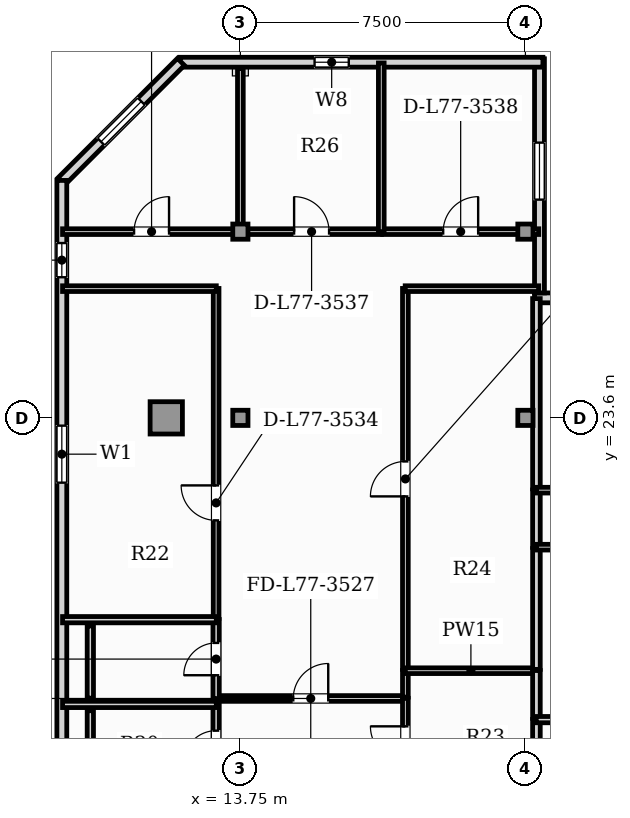
"""IFC4 building model, lengths in metres.
Left out: names, types, materials, properties, quantities, classifications, styles, units other than length and angle.
Written with IfcOpenShell. Run it as: python <this file> out.ifc"""

import sys

from ifc_helpers import new_model, si_unit, direction, frame, frame_2d, origin, origin_2d, place, context, subcontext, project, spatial, rectangle, hollow_rectangle, extrude, element, fill, save


model = new_model("IFC4")
c1 = context("Model", 3, precision=1e-05, world=origin(), true_north=direction((0.0, 1.0)))
c2 = subcontext(c1, "Body", "Model", "MODEL_VIEW")
j1 = project(units=[si_unit("LENGTHUNIT", "METRE"), si_unit("PLANEANGLEUNIT", "RADIAN")], contexts=[c1])
p1 = place(None, origin())
s1 = spatial("IfcSite", under=j1, at=p1, CompositionType="ELEMENT")
p2 = place(p1, origin())
s2 = spatial("IfcBuilding", under=s1, at=p2, CompositionType="ELEMENT")
p3 = place(p2, frame((0.0, 0.0, 313.05)))
s3 = spatial("IfcBuildingStorey", under=s2, at=p3, CompositionType="ELEMENT", Elevation=313.05)
p4 = place(p3, frame((11.8, 23.6, 0.0), z_axis=(0.0, 0.0, 1.0), x_axis=(1.0, 0.0, 0.0)))
e1 = element("IfcColumn", 1, at=p4, inside=s3, PredefinedType="USERDEFINED", context=c2, shape_type="SweptSolid", body=[
    extrude(hollow_rectangle(XDim=0.85, YDim=0.85, WallThickness=0.05, at=origin_2d()), origin(), (0.0, 0.0, 1.0), 3.85),
])
for number, where, z_axis, x_axis in (
    (2, (13.75, 23.6, 0.0), (0.0, 0.0, 1.0), (1.0, 0.0, 0.0)),
    (3, (21.25, 23.6, 0.0), (0.0, 0.0, 1.0), (1.0, 0.0, 0.0)),
    (4, (13.75, 28.5, 0.0), (0.0, 0.0, 1.0), (1.0, 0.0, 0.0)),
    (5, (21.25, 28.5, 0.0), (0.0, 0.0, 1.0), (1.0, 0.0, 0.0)),
):
    element("IfcColumn", number, at=place(p3, frame(where, z_axis=z_axis, x_axis=x_axis)), inside=s3, PredefinedType="COLUMN", context=c2, shape_type="SweptSolid", body=[
        extrude(hollow_rectangle(XDim=0.4, YDim=0.4, WallThickness=0.02, at=origin_2d()), origin(), (0.0, 0.0, 1.0), 3.85),
    ])
p5 = place(p3, frame((21.49, 26.758, 0.0), z_axis=(0.0, 0.0, 1.0), x_axis=(1.0, 0.0, 0.0)))
e6 = element("IfcWall", 6, at=p5, inside=s3, PredefinedType="SOLIDWALL", context=c2, shape_type="SweptSolid", body=[
    extrude(rectangle(XDim=1.76, YDim=0.26, at=frame_2d((0.88, 0.0))), origin(), (0.0, 0.0, 1.0), 3.65),
])
p6 = place(p3, frame((21.62, 26.887, 0.0), z_axis=(0.0, 0.0, 1.0), x_axis=(0.0, 1.0, 0.0)))
e7 = element("IfcWall", 7, at=p6, inside=s3, PredefinedType="SOLIDWALL", context=c2, shape_type="SweptSolid", body=[
    extrude(rectangle(XDim=6.16, YDim=0.26, at=frame_2d((3.08, 0.0))), origin(), (0.0, 0.0, 1.0), 3.65),
])
p7 = place(p6, frame((2.455, 0.0, 0.9)))
e8 = element("IfcOpeningElement", 8, at=p7, cuts=e7, PredefinedType="OPENING", context=c2, shape_type="SweptSolid", body=[
    extrude(rectangle(XDim=1.5, YDim=1.95, at=frame_2d((0.75, 0.975))), frame((0.0, 0.14, 0.0), z_axis=(0.0, -1.0, 0.0), x_axis=(1.0, 0.0, 0.0)), (0.0, 0.0, 1.0), 0.28),
])
p8 = place(p3, frame((21.71, 32.958, 0.0), z_axis=(0.0, 0.0, 1.0), x_axis=(-1.0, 0.0, 0.0)))
e9 = element("IfcWall", 9, at=p8, inside=s3, PredefinedType="SOLIDWALL", context=c2, shape_type="SweptSolid", body=[
    extrude(rectangle(XDim=9.548, YDim=0.26, at=frame_2d((4.774, 0.0))), origin(), (0.0, 0.0, 1.0), 3.65),
])
p9 = place(p8, frame((5.108, 0.0, 0.9)))
e10 = element("IfcOpeningElement", 10, at=p9, cuts=e9, PredefinedType="OPENING", context=c2, shape_type="SweptSolid", body=[
    extrude(rectangle(XDim=0.9, YDim=1.4, at=frame_2d((0.45, 0.7))), frame((0.0, 0.14, 0.0), z_axis=(0.0, -1.0, 0.0), x_axis=(1.0, 0.0, 0.0)), (0.0, 0.0, 1.0), 0.28),
])
p10 = place(p3, frame((12.186, 32.967, 0.0), z_axis=(0.0, 0.0, 1.0), x_axis=(-0.707134240044, -0.707079321262, 0.0)))
e11 = element("IfcWall", 11, at=p10, inside=s3, PredefinedType="SOLIDWALL", context=c2, shape_type="SweptSolid", body=[
    extrude(rectangle(XDim=4.446, YDim=0.26, at=frame_2d((2.223, 0.0))), origin(), (0.0, 0.0, 1.0), 3.65),
])
p11 = place(p10, frame((1.473, 0.0, 0.9)))
e12 = element("IfcOpeningElement", 12, at=p11, cuts=e11, PredefinedType="OPENING", context=c2, shape_type="SweptSolid", body=[
    extrude(rectangle(XDim=1.5, YDim=1.95, at=frame_2d((0.75, 0.975))), frame((0.0, 0.14, 0.0), z_axis=(0.0, -1.0, 0.0), x_axis=(1.0, 0.0, 0.0)), (0.0, 0.0, 1.0), 0.28),
])
p12 = place(p3, frame((9.052, 29.847, 0.0), z_axis=(0.0, 0.0, 1.0), x_axis=(0.0, -1.0, 0.0)))
e13 = element("IfcWall", 13, at=p12, inside=s3, PredefinedType="SOLIDWALL", context=c2, shape_type="SweptSolid", body=[
    extrude(rectangle(XDim=26.607, YDim=0.26, at=frame_2d((13.304, 0.0))), origin(), (0.0, 0.0, 1.0), 3.65),
])
p13 = place(p12, frame((20.707, 0.0, 0.85)))
e14 = element("IfcOpeningElement", 14, at=p13, cuts=e13, PredefinedType="OPENING", context=c2, shape_type="SweptSolid", body=[
    extrude(rectangle(XDim=2.1, YDim=2.05, at=frame_2d((1.05, 1.025))), frame((0.0, 0.14, 0.0), z_axis=(0.0, -1.0, 0.0), x_axis=(1.0, 0.0, 0.0)), (0.0, 0.0, 1.0), 0.28),
])
p14 = place(p12, frame((1.647, 0.0, 0.95)))
e15 = element("IfcOpeningElement", 15, at=p14, cuts=e13, PredefinedType="OPENING", context=c2, shape_type="SweptSolid", body=[
    extrude(rectangle(XDim=0.9, YDim=1.5, at=frame_2d((0.45, 0.75))), frame((0.0, 0.14, 0.0), z_axis=(0.0, -1.0, 0.0), x_axis=(1.0, 0.0, 0.0)), (0.0, 0.0, 1.0), 0.28),
])
p15 = place(p12, frame((6.453, 0.0, 0.9)))
e16 = element("IfcOpeningElement", 16, at=p15, cuts=e13, PredefinedType="OPENING", context=c2, shape_type="SweptSolid", body=[
    extrude(rectangle(XDim=1.5, YDim=1.95, at=frame_2d((0.75, 0.975))), frame((0.0, 0.14, 0.0), z_axis=(0.0, -1.0, 0.0), x_axis=(1.0, 0.0, 0.0)), (0.0, 0.0, 1.0), 0.28),
])
p16 = place(p3, frame((13.107, 16.217, 0.0), z_axis=(0.0, 0.0, 1.0), x_axis=(1.0, 0.0, 0.0)))
e17 = element("IfcWall", 17, at=p16, inside=s3, PredefinedType="PARTITIONING", context=c2, shape_type="SweptSolid", body=[
    extrude(rectangle(XDim=4.99, YDim=0.15, at=frame_2d((2.495, 0.0))), origin(), (0.0, 0.0, 1.0), 3.65),
])
p17 = place(p16, frame((2.035, 0.0, 0.0)))
e18 = element("IfcOpeningElement", 18, at=p17, cuts=e17, PredefinedType="OPENING", context=c2, shape_type="SweptSolid", body=[
    extrude(rectangle(XDim=0.92, YDim=2.1, at=frame_2d((0.46, 1.05))), frame((0.0, 0.085, 0.0), z_axis=(0.0, -1.0, 0.0), x_axis=(1.0, 0.0, 0.0)), (0.0, 0.0, 1.0), 0.17),
])
p18 = place(p3, frame((13.112, 13.825, 0.0), z_axis=(0.0, 0.0, 1.0), x_axis=(0.0, 1.0, 0.0)))
e19 = element("IfcWall", 19, at=p18, inside=s3, PredefinedType="PLUMBINGWALL", context=c2, shape_type="SweptSolid", body=[
    extrude(rectangle(XDim=2.24, YDim=0.165, at=frame_2d((1.12, 0.0))), origin(), (0.0, 0.0, 1.0), 3.65),
])
p19 = place(p18, frame((0.695, 0.0, 0.0)))
e20 = element("IfcOpeningElement", 20, at=p19, cuts=e19, PredefinedType="OPENING", context=c2, shape_type="SweptSolid", body=[
    extrude(rectangle(XDim=0.85, YDim=2.1, at=frame_2d((0.425, 1.05))), frame((0.0, 0.093, 0.0), z_axis=(0.0, -1.0, 0.0), x_axis=(1.0, 0.0, 0.0)), (0.0, 0.0, 1.0), 0.185),
])
p20 = place(p3, frame((18.092, 13.825, 0.0), z_axis=(0.0, 0.0, 1.0), x_axis=(0.0, 1.0, 0.0)))
e21 = element("IfcWall", 21, at=p20, inside=s3, PredefinedType="PARTITIONING", context=c2, shape_type="SweptSolid", body=[
    extrude(rectangle(XDim=2.397, YDim=0.15, at=frame_2d((1.198, 0.0))), origin(), (0.0, 0.0, 1.0), 3.65),
])
p21 = place(p20, frame((0.738, 0.0, 0.0)))
e22 = element("IfcOpeningElement", 22, at=p21, cuts=e21, PredefinedType="OPENING", context=c2, shape_type="SweptSolid", body=[
    extrude(rectangle(XDim=0.92, YDim=2.1, at=frame_2d((0.46, 1.05))), frame((0.0, 0.085, 0.0), z_axis=(0.0, -1.0, 0.0), x_axis=(1.0, 0.0, 0.0)), (0.0, 0.0, 1.0), 0.17),
])
p22 = place(p3, frame((13.112, 16.212, 0.0), z_axis=(0.0, 0.0, 1.0), x_axis=(0.0, 1.0, 0.0)))
e23 = element("IfcWall", 23, at=p22, inside=s3, PredefinedType="PLUMBINGWALL", context=c2, shape_type="SweptSolid", body=[
    extrude(rectangle(XDim=2.083, YDim=0.165, at=frame_2d((1.042, 0.0))), origin(), (0.0, 0.0, 1.0), 3.65),
])
p23 = place(p22, frame((0.616, 0.0, 0.0)))
e24 = element("IfcOpeningElement", 24, at=p23, cuts=e23, PredefinedType="OPENING", context=c2, shape_type="SweptSolid", body=[
    extrude(rectangle(XDim=0.85, YDim=2.1, at=frame_2d((0.425, 1.05))), frame((0.0, 0.093, 0.0), z_axis=(0.0, -1.0, 0.0), x_axis=(1.0, 0.0, 0.0)), (0.0, 0.0, 1.0), 0.185),
])
p24 = place(p3, frame((13.112, 18.325, 0.0), z_axis=(0.0, 0.0, 1.0), x_axis=(0.0, 1.0, 0.0)))
e25 = element("IfcWall", 25, at=p24, inside=s3, PredefinedType="PARTITIONING", context=c2, shape_type="SweptSolid", body=[
    extrude(rectangle(XDim=8.68, YDim=0.15, at=frame_2d((4.34, 0.0))), origin(), (0.0, 0.0, 1.0), 3.65),
])
p25 = place(p24, frame((2.578, 0.0, 0.0)))
e26 = element("IfcOpeningElement", 26, at=p25, cuts=e25, PredefinedType="OPENING", context=c2, shape_type="SweptSolid", body=[
    extrude(rectangle(XDim=0.92, YDim=2.1, at=frame_2d((0.46, 1.05))), frame((0.0, 0.085, 0.0), z_axis=(0.0, -1.0, 0.0), x_axis=(1.0, 0.0, 0.0)), (0.0, 0.0, 1.0), 0.17),
])
p26 = place(p3, frame((9.071, 27.0, 0.0), z_axis=(0.0, 0.0, 1.0), x_axis=(1.0, 0.0, 0.0)))
e27 = element("IfcWall", 27, at=p26, inside=s3, PredefinedType="PARTITIONING", context=c2, shape_type="SweptSolid", body=[
    extrude(rectangle(XDim=4.045, YDim=0.15, at=frame_2d((2.023, 0.0))), origin(), (0.0, 0.0, 1.0), 3.65),
])
p27 = place(p3, frame((18.092, 16.252, 0.0), z_axis=(0.0, 0.0, 1.0), x_axis=(0.0, 1.0, 0.0)))
e28 = element("IfcWall", 28, at=p27, inside=s3, PredefinedType="PARTITIONING", context=c2, shape_type="SweptSolid", body=[
    extrude(rectangle(XDim=0.701, YDim=0.15, at=frame_2d((0.35, 0.0))), origin(), (0.0, 0.0, 1.0), 3.65),
])
p28 = place(p3, frame((18.092, 16.982, 0.0), z_axis=(0.0, 0.0, 1.0), x_axis=(0.0, 1.0, 0.0)))
e29 = element("IfcWall", 29, at=p28, inside=s3, PredefinedType="PARTITIONING", context=c2, shape_type="SweptSolid", body=[
    extrude(rectangle(XDim=10.022, YDim=0.15, at=frame_2d((5.011, 0.0))), origin(), (0.0, 0.0, 1.0), 3.65),
])
p29 = place(p28, frame((4.551, 0.0, 0.0)))
e30 = element("IfcOpeningElement", 30, at=p29, cuts=e29, PredefinedType="OPENING", context=c2, shape_type="SweptSolid", body=[
    extrude(rectangle(XDim=0.92, YDim=2.1, at=frame_2d((0.46, 1.05))), frame((0.0, 0.085, 0.0), z_axis=(0.0, -1.0, 0.0), x_axis=(1.0, 0.0, 0.0)), (0.0, 0.0, 1.0), 0.17),
])
p30 = place(p3, frame((18.087, 27.0, 0.0), z_axis=(0.0, 0.0, 1.0), x_axis=(1.0, 0.0, 0.0)))
e31 = element("IfcWall", 31, at=p30, inside=s3, PredefinedType="PARTITIONING", context=c2, shape_type="SweptSolid", body=[
    extrude(rectangle(XDim=3.514, YDim=0.15, at=frame_2d((1.757, 0.0))), origin(), (0.0, 0.0, 1.0), 3.65),
])
p31 = place(p3, frame((9.071, 28.5, 0.0), z_axis=(0.0, 0.0, 1.0), x_axis=(1.0, 0.0, 0.0)))
e32 = element("IfcWall", 32, at=p31, inside=s3, PredefinedType="PARTITIONING", context=c2, shape_type="SweptSolid", body=[
    extrude(rectangle(XDim=4.684, YDim=0.15, at=frame_2d((2.342, 0.0))), origin(), (0.0, 0.0, 1.0), 3.65),
])
p32 = place(p31, frame((1.882, 0.0, 0.0)))
e33 = element("IfcOpeningElement", 33, at=p32, cuts=e32, PredefinedType="OPENING", context=c2, shape_type="SweptSolid", body=[
    extrude(rectangle(XDim=0.92, YDim=2.1, at=frame_2d((0.46, 1.05))), frame((0.0, 0.085, 0.0), z_axis=(0.0, -1.0, 0.0), x_axis=(1.0, 0.0, 0.0)), (0.0, 0.0, 1.0), 0.17),
])
p33 = place(p3, frame((13.785, 28.5, 0.0), z_axis=(0.0, 0.0, 1.0), x_axis=(1.0, 0.0, 0.0)))
e34 = element("IfcWall", 34, at=p33, inside=s3, PredefinedType="PARTITIONING", context=c2, shape_type="SweptSolid", body=[
    extrude(rectangle(XDim=3.677, YDim=0.15, at=frame_2d((1.839, 0.0))), origin(), (0.0, 0.0, 1.0), 3.117),
])
p34 = place(p33, frame((1.379, 0.0, 0.0)))
e35 = element("IfcOpeningElement", 35, at=p34, cuts=e34, PredefinedType="OPENING", context=c2, shape_type="SweptSolid", body=[
    extrude(rectangle(XDim=0.92, YDim=2.1, at=frame_2d((0.46, 1.05))), frame((0.0, 0.085, 0.0), z_axis=(0.0, -1.0, 0.0), x_axis=(1.0, 0.0, 0.0)), (0.0, 0.0, 1.0), 0.17),
])
p35 = place(p3, frame((17.492, 28.5, 0.0), z_axis=(0.0, 0.0, 1.0), x_axis=(1.0, 0.0, 0.0)))
e36 = element("IfcWall", 36, at=p35, inside=s3, PredefinedType="PARTITIONING", context=c2, shape_type="SweptSolid", body=[
    extrude(rectangle(XDim=4.108, YDim=0.15, at=frame_2d((2.054, 0.0))), origin(), (0.0, 0.0, 1.0), 3.117),
])
p36 = place(p35, frame((1.594, 0.0, 0.0)))
e37 = element("IfcOpeningElement", 37, at=p36, cuts=e36, PredefinedType="OPENING", context=c2, shape_type="SweptSolid", body=[
    extrude(rectangle(XDim=0.92, YDim=2.1, at=frame_2d((0.46, 1.05))), frame((0.0, 0.085, 0.0), z_axis=(0.0, -1.0, 0.0), x_axis=(1.0, 0.0, 0.0)), (0.0, 0.0, 1.0), 0.17),
])
for number, where, z_axis, x_axis in (
    (38, (9.071, 16.06, 0.0), (0.0, 0.0, 1.0), (1.0, 0.0, 0.0)),
    (39, (9.071, 18.29, 0.0), (0.0, 0.0, 1.0), (1.0, 0.0, 0.0)),
):
    element("IfcWall", number, at=place(p3, frame(where, z_axis=z_axis, x_axis=x_axis)), inside=s3, PredefinedType="PLUMBINGWALL", context=c2, shape_type="SweptSolid", body=[
        extrude(rectangle(XDim=4.045, YDim=0.165, at=frame_2d((2.023, 0.0))), origin(), (0.0, 0.0, 1.0), 3.65),
    ])
p37 = place(p3, frame((18.087, 16.947, 0.0), z_axis=(0.0, 0.0, 1.0), x_axis=(1.0, 0.0, 0.0)))
e40 = element("IfcWall", 40, at=p37, inside=s3, PredefinedType="PARTITIONING", context=c2, shape_type="SweptSolid", body=[
    extrude(rectangle(XDim=3.458, YDim=0.15, at=frame_2d((1.729, 0.0))), origin(), (0.0, 0.0, 1.0), 3.65),
])
p38 = place(p3, frame((21.54, 13.825, 0.0), z_axis=(0.0, 0.0, 1.0), x_axis=(0.0, 1.0, 0.0)))
e41 = element("IfcWall", 41, at=p38, inside=s3, PredefinedType="PARTITIONING", context=c2, shape_type="SweptSolid", body=[
    extrude(rectangle(XDim=1.84, YDim=0.2, at=frame_2d((0.92, 0.0))), origin(), (0.0, 0.0, 1.0), 3.65),
])
p39 = place(p3, frame((21.54, 15.695, 0.0), z_axis=(0.0, 0.0, 1.0), x_axis=(0.0, 1.0, 0.0)))
e42 = element("IfcWall", 42, at=p39, inside=s3, PredefinedType="PARTITIONING", context=c2, shape_type="SweptSolid", body=[
    extrude(rectangle(XDim=1.257, YDim=0.2, at=frame_2d((0.629, 0.0))), origin(), (0.0, 0.0, 1.0), 3.65),
])
p40 = place(p3, frame((21.54, 20.192, 0.0), z_axis=(0.0, 0.0, 1.0), x_axis=(0.0, 1.0, 0.0)))
e43 = element("IfcWall", 43, at=p40, inside=s3, PredefinedType="PARTITIONING", context=c2, shape_type="SweptSolid", body=[
    extrude(rectangle(XDim=1.51, YDim=0.2, at=frame_2d((0.755, 0.0))), origin(), (0.0, 0.0, 1.0), 3.65),
])
p41 = place(p3, frame((21.54, 16.982, 0.0), z_axis=(0.0, 0.0, 1.0), x_axis=(0.0, 1.0, 0.0)))
e44 = element("IfcWall", 44, at=p41, inside=s3, PredefinedType="PARTITIONING", context=c2, shape_type="SweptSolid", body=[
    extrude(rectangle(XDim=3.18, YDim=0.2, at=frame_2d((1.59, 0.0))), origin(), (0.0, 0.0, 1.0), 3.65),
])
p42 = place(p3, frame((21.54, 21.732, 0.0), z_axis=(0.0, 0.0, 1.0), x_axis=(0.0, 1.0, 0.0)))
e45 = element("IfcWall", 45, at=p42, inside=s3, PredefinedType="PARTITIONING", context=c2, shape_type="SweptSolid", body=[
    extrude(rectangle(XDim=5.006, YDim=0.2, at=frame_2d((2.503, 0.0))), origin(), (0.0, 0.0, 1.0), 3.65),
])
p43 = place(p3, frame((13.75, 28.495, 0.0), z_axis=(0.0, 0.0, 1.0), x_axis=(0.0, 1.0, 0.0)))
e46 = element("IfcWall", 46, at=p43, inside=s3, PredefinedType="PARTITIONING", context=c2, shape_type="SweptSolid", body=[
    extrude(rectangle(XDim=4.294, YDim=0.15, at=frame_2d((2.147, 0.0))), origin(), (0.0, 0.0, 1.0), 3.65),
])
p44 = place(p3, frame((17.458, 28.495, 0.0), z_axis=(0.0, 0.0, 1.0), x_axis=(0.0, 1.0, 0.0)))
e47 = element("IfcWall", 47, at=p44, inside=s3, PredefinedType="PARTITIONING", context=c2, shape_type="SweptSolid", body=[
    extrude(rectangle(XDim=4.443, YDim=0.15, at=frame_2d((2.221, 0.0))), origin(), (0.0, 0.0, 1.0), 3.65),
])
p45 = place(p3, frame((21.535, 20.198, 0.0), z_axis=(0.0, 0.0, 1.0), x_axis=(1.0, 0.0, 0.0)))
e48 = element("IfcWall", 48, at=p45, inside=s3, PredefinedType="PARTITIONING", context=c2, shape_type="SweptSolid", body=[
    extrude(rectangle(XDim=4.73, YDim=0.15, at=frame_2d((2.365, 0.0))), origin(), (0.0, 0.0, 1.0), 3.65),
])
p46 = place(p45, frame((1.905, 0.0, 0.0)))
e49 = element("IfcOpeningElement", 49, at=p46, cuts=e48, PredefinedType="OPENING", context=c2, shape_type="SweptSolid", body=[
    extrude(rectangle(XDim=0.92, YDim=2.1, at=frame_2d((0.46, 1.05))), frame((0.0, 0.085, 0.0), z_axis=(0.0, -1.0, 0.0), x_axis=(1.0, 0.0, 0.0)), (0.0, 0.0, 1.0), 0.17),
])
p47 = place(p3, frame((21.535, 21.698, 0.0), z_axis=(0.0, 0.0, 1.0), x_axis=(1.0, 0.0, 0.0)))
e50 = element("IfcWall", 50, at=p47, inside=s3, PredefinedType="PARTITIONING", context=c2, shape_type="SweptSolid", body=[
    extrude(rectangle(XDim=7.22, YDim=0.15, at=frame_2d((3.61, 0.0))), origin(), (0.0, 0.0, 1.0), 3.65),
])
p48 = place(p47, frame((3.15, 0.0, 0.0)))
e51 = element("IfcOpeningElement", 51, at=p48, cuts=e50, PredefinedType="OPENING", context=c2, shape_type="SweptSolid", body=[
    extrude(rectangle(XDim=0.92, YDim=2.1, at=frame_2d((0.46, 1.05))), frame((0.0, 0.085, 0.0), z_axis=(0.0, -1.0, 0.0), x_axis=(1.0, 0.0, 0.0)), (0.0, 0.0, 1.0), 0.17),
])
p49 = place(p3, frame((21.535, 15.66, 0.0), z_axis=(0.0, 0.0, 1.0), x_axis=(1.0, 0.0, 0.0)))
e52 = element("IfcWall", 52, at=p49, inside=s3, PredefinedType="PLUMBINGWALL", context=c2, shape_type="SweptSolid", body=[
    extrude(rectangle(XDim=4.73, YDim=0.165, at=frame_2d((2.365, 0.0))), origin(), (0.0, 0.0, 1.0), 3.65),
])
for number, where, z_axis, x_axis in (
    (53, (9.802, 13.995, 0.0), (0.0, 0.0, 1.0), (0.0, 1.0, 0.0)),
    (54, (9.802, 16.225, 0.0), (0.0, 0.0, 1.0), (0.0, 1.0, 0.0)),
):
    element("IfcWall", number, at=place(p3, frame(where, z_axis=z_axis, x_axis=x_axis)), inside=s3, PredefinedType="PLUMBINGWALL", context=c2, shape_type="SweptSolid", body=[
        extrude(rectangle(XDim=1.9, YDim=0.165, at=frame_2d((0.95, 0.0))), origin(), (0.0, 0.0, 1.0), 3.65),
    ])
p50 = place(p14, origin())
e55 = element("IfcWindow", 55, at=p50, inside=s3, PartitioningType="SINGLE_PANEL", PredefinedType="WINDOW", context=c2, shape_type="SweptSolid", body=[
    extrude(rectangle(XDim=0.9, YDim=1.5, at=frame_2d((0.45, 0.75))), frame((0.0, 0.03, 0.0), z_axis=(0.0, -1.0, 0.0), x_axis=(1.0, 0.0, 0.0)), (0.0, 0.0, 1.0), 0.06),
])
fill(e15, e55)
p51 = place(p15, origin())
e56 = element("IfcWindow", 56, at=p51, inside=s3, PartitioningType="SINGLE_PANEL", PredefinedType="WINDOW", context=c2, shape_type="SweptSolid", body=[
    extrude(rectangle(XDim=1.5, YDim=1.95, at=frame_2d((0.75, 0.975))), frame((0.0, 0.03, 0.0), z_axis=(0.0, -1.0, 0.0), x_axis=(1.0, 0.0, 0.0)), (0.0, 0.0, 1.0), 0.06),
])
fill(e16, e56)
p52 = place(p11, origin())
e57 = element("IfcWindow", 57, at=p52, inside=s3, PartitioningType="SINGLE_PANEL", PredefinedType="WINDOW", context=c2, shape_type="SweptSolid", body=[
    extrude(rectangle(XDim=1.5, YDim=1.95, at=frame_2d((0.75, 0.975))), frame((0.0, 0.03, 0.0), z_axis=(0.0, -1.0, 0.0), x_axis=(1.0, 0.0, 0.0)), (0.0, 0.0, 1.0), 0.06),
])
fill(e12, e57)
p53 = place(p9, origin())
e58 = element("IfcWindow", 58, at=p53, inside=s3, PartitioningType="SINGLE_PANEL", PredefinedType="WINDOW", context=c2, shape_type="SweptSolid", body=[
    extrude(rectangle(XDim=0.9, YDim=1.4, at=frame_2d((0.45, 0.7))), frame((0.0, 0.03, 0.0), z_axis=(0.0, -1.0, 0.0), x_axis=(1.0, 0.0, 0.0)), (0.0, 0.0, 1.0), 0.06),
])
fill(e10, e58)
p54 = place(p7, origin())
e59 = element("IfcWindow", 59, at=p54, inside=s3, PartitioningType="SINGLE_PANEL", PredefinedType="WINDOW", context=c2, shape_type="SweptSolid", body=[
    extrude(rectangle(XDim=1.5, YDim=1.95, at=frame_2d((0.75, 0.975))), frame((0.0, 0.03, 0.0), z_axis=(0.0, -1.0, 0.0), x_axis=(1.0, 0.0, 0.0)), (0.0, 0.0, 1.0), 0.06),
])
fill(e8, e59)
p55 = place(p17, origin())
e60 = element("IfcDoor", 60, at=p55, inside=s3, OperationType="SINGLE_SWING_RIGHT", PredefinedType="DOOR", context=c2, shape_type="SweptSolid", body=[
    extrude(rectangle(XDim=0.92, YDim=2.1, at=frame_2d((0.46, 1.05))), frame((0.0, 0.025, 0.0), z_axis=(0.0, -1.0, 0.0), x_axis=(1.0, 0.0, 0.0)), (0.0, 0.0, 1.0), 0.05),
])
fill(e18, e60)
p56 = place(p19, origin())
e61 = element("IfcDoor", 61, at=p56, inside=s3, OperationType="SINGLE_SWING_LEFT", PredefinedType="DOOR", context=c2, shape_type="SweptSolid", body=[
    extrude(rectangle(XDim=0.85, YDim=2.1, at=frame_2d((0.425, 1.05))), frame((0.0, 0.025, 0.0), z_axis=(0.0, -1.0, 0.0), x_axis=(1.0, 0.0, 0.0)), (0.0, 0.0, 1.0), 0.05),
])
fill(e20, e61)
p57 = place(p21, origin())
e62 = element("IfcDoor", 62, at=p57, inside=s3, OperationType="SINGLE_SWING_RIGHT", PredefinedType="DOOR", context=c2, shape_type="SweptSolid", body=[
    extrude(rectangle(XDim=0.92, YDim=2.1, at=frame_2d((0.46, 1.05))), frame((0.0, 0.025, 0.0), z_axis=(0.0, -1.0, 0.0), x_axis=(1.0, 0.0, 0.0)), (0.0, 0.0, 1.0), 0.05),
])
fill(e22, e62)
p58 = place(p23, origin())
e63 = element("IfcDoor", 63, at=p58, inside=s3, OperationType="SINGLE_SWING_LEFT", PredefinedType="DOOR", context=c2, shape_type="SweptSolid", body=[
    extrude(rectangle(XDim=0.85, YDim=2.1, at=frame_2d((0.425, 1.05))), frame((0.0, 0.025, 0.0), z_axis=(0.0, -1.0, 0.0), x_axis=(1.0, 0.0, 0.0)), (0.0, 0.0, 1.0), 0.05),
])
fill(e24, e63)
p59 = place(p25, origin())
e64 = element("IfcDoor", 64, at=p59, inside=s3, OperationType="SINGLE_SWING_RIGHT", PredefinedType="DOOR", context=c2, shape_type="SweptSolid", body=[
    extrude(rectangle(XDim=0.92, YDim=2.1, at=frame_2d((0.46, 1.05))), frame((0.0, 0.025, 0.0), z_axis=(0.0, -1.0, 0.0), x_axis=(1.0, 0.0, 0.0)), (0.0, 0.0, 1.0), 0.05),
])
fill(e26, e64)
p60 = place(p29, origin())
e65 = element("IfcDoor", 65, at=p60, inside=s3, OperationType="SINGLE_SWING_LEFT", PredefinedType="DOOR", context=c2, shape_type="SweptSolid", body=[
    extrude(rectangle(XDim=0.92, YDim=2.1, at=frame_2d((0.46, 1.05))), frame((0.0, 0.025, 0.0), z_axis=(0.0, -1.0, 0.0), x_axis=(1.0, 0.0, 0.0)), (0.0, 0.0, 1.0), 0.05),
])
fill(e30, e65)
p61 = place(p32, origin())
e66 = element("IfcDoor", 66, at=p61, inside=s3, OperationType="SINGLE_SWING_RIGHT", PredefinedType="DOOR", context=c2, shape_type="SweptSolid", body=[
    extrude(rectangle(XDim=0.92, YDim=2.1, at=frame_2d((0.46, 1.05))), frame((0.0, 0.025, 0.0), z_axis=(0.0, -1.0, 0.0), x_axis=(1.0, 0.0, 0.0)), (0.0, 0.0, 1.0), 0.05),
])
fill(e33, e66)
p62 = place(p34, origin())
e67 = element("IfcDoor", 67, at=p62, inside=s3, OperationType="SINGLE_SWING_LEFT", PredefinedType="DOOR", context=c2, shape_type="SweptSolid", body=[
    extrude(rectangle(XDim=0.92, YDim=2.1, at=frame_2d((0.46, 1.05))), frame((0.0, 0.025, 0.0), z_axis=(0.0, -1.0, 0.0), x_axis=(1.0, 0.0, 0.0)), (0.0, 0.0, 1.0), 0.05),
])
fill(e35, e67)
p63 = place(p36, origin())
e68 = element("IfcDoor", 68, at=p63, inside=s3, OperationType="SINGLE_SWING_RIGHT", PredefinedType="DOOR", context=c2, shape_type="SweptSolid", body=[
    extrude(rectangle(XDim=0.92, YDim=2.1, at=frame_2d((0.46, 1.05))), frame((0.0, 0.025, 0.0), z_axis=(0.0, -1.0, 0.0), x_axis=(1.0, 0.0, 0.0)), (0.0, 0.0, 1.0), 0.05),
])
fill(e37, e68)
save(model, sys.argv[1])
